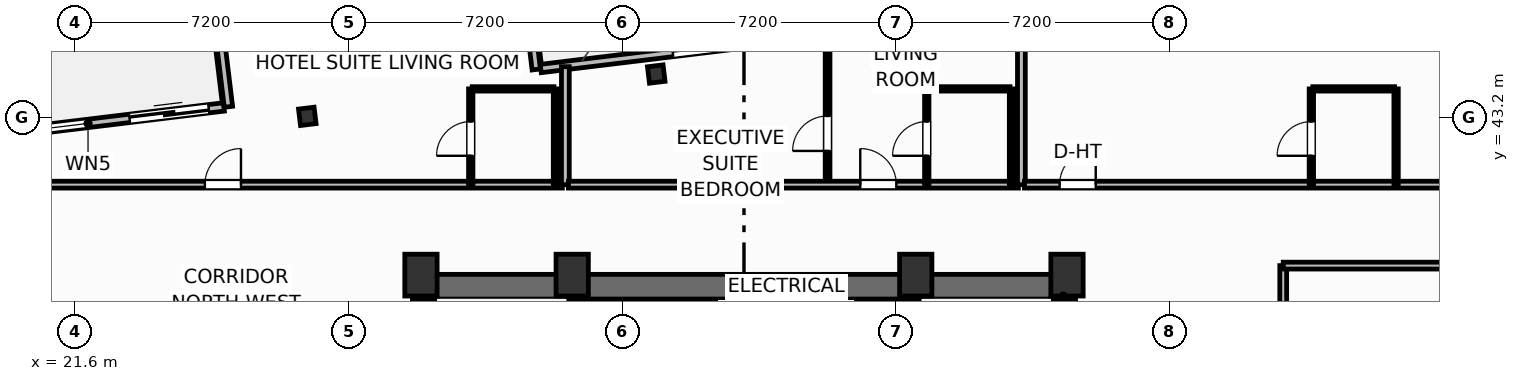
"""IFC4 building model, lengths in metres.
Left out: names, types, materials, properties, quantities, classifications, styles, units other than length and angle.
Written with IfcOpenShell. Run it as: python <this file> out.ifc"""

import sys

from ifc_helpers import new_model, si_unit, direction, frame, frame_2d, origin, origin_2d, place, context, subcontext, project, spatial, rectangle, i_section, extrude, element, fill, save


model = new_model("IFC4")
c1 = context("Model", 3, precision=1e-05, world=origin(), true_north=direction((0.0, 1.0)))
c2 = subcontext(c1, "Body", "Model", "MODEL_VIEW")
j1 = project(units=[si_unit("LENGTHUNIT", "METRE"), si_unit("PLANEANGLEUNIT", "RADIAN")], contexts=[c1])
p1 = place(None, origin())
s1 = spatial("IfcSite", under=j1, at=p1, CompositionType="ELEMENT")
p2 = place(p1, origin())
s2 = spatial("IfcBuilding", under=s1, at=p2, CompositionType="ELEMENT")
p3 = place(p2, frame((0.0, 0.0, 174.6)))
s3 = spatial("IfcBuildingStorey", under=s2, at=p3, CompositionType="ELEMENT", Elevation=174.6)
for number, where, z_axis, x_axis in (
    (1, (30.7, 39.05, 0.0), (0.0, 0.0, 1.0), (1.0, 0.0, 0.0)),
    (2, (34.68, 39.05, 0.0), (0.0, 0.0, 1.0), (1.0, 0.0, 0.0)),
    (3, (43.72, 39.05, 0.0), (0.0, 0.0, 1.0), (1.0, 0.0, 0.0)),
    (4, (47.7, 39.05, 0.0), (0.0, 0.0, 1.0), (1.0, 0.0, 0.0)),
):
    element("IfcColumn", number, at=place(p3, frame(where, z_axis=z_axis, x_axis=x_axis)), inside=s3, PredefinedType="COLUMN", context=c2, shape_type="SweptSolid", body=[
        extrude(rectangle(XDim=0.85, YDim=1.1, at=origin_2d()), origin(), (0.0, 0.0, 1.0), 3.7),
    ])
p4 = place(p3, frame((30.48, 38.745, 0.0), z_axis=(0.0, 0.0, 1.0), x_axis=(1.0, 0.0, 0.0)))
e5 = element("IfcWall", 5, at=p4, inside=s3, PredefinedType="SHEAR", context=c2, shape_type="SweptSolid", body=[
    extrude(rectangle(XDim=17.44, YDim=0.65, at=frame_2d((8.72, 0.0))), origin(), (0.0, 0.0, 1.0), 3.45),
])
for number, where, z_axis, x_axis in (
    (6, (30.805, 29.2, 0.0), (0.0, 0.0, 1.0), (0.0, 1.0, 0.0)),
    (7, (47.595, 29.2, 0.0), (0.0, 0.0, 1.0), (0.0, 1.0, 0.0)),
):
    element("IfcWall", number, at=place(p3, frame(where, z_axis=z_axis, x_axis=x_axis)), inside=s3, PredefinedType="SHEAR", context=c2, shape_type="SweptSolid", body=[
        extrude(rectangle(XDim=9.22, YDim=0.65, at=frame_2d((4.61, 0.0))), origin(), (0.0, 0.0, 1.0), 3.45),
    ])
p5 = place(p3, frame((34.64, 29.2, 0.0), z_axis=(0.0, 0.0, 1.0), x_axis=(0.0, 1.0, 0.0)))
e8 = element("IfcWall", 8, at=p5, inside=s3, PredefinedType="SHEAR", context=c2, shape_type="SweptSolid", body=[
    extrude(rectangle(XDim=9.22, YDim=0.25, at=frame_2d((4.61, 0.0))), origin(), (0.0, 0.0, 1.0), 3.45),
])
p6 = place(p5, frame((0.65, 0.0, 0.0)))
e9 = element("IfcOpeningElement", 9, at=p6, cuts=e8, PredefinedType="OPENING", context=c2, shape_type="SweptSolid", body=[
    extrude(rectangle(XDim=1.05, YDim=2.15, at=frame_2d((0.525, 1.075))), frame((0.0, 0.135, 0.0), z_axis=(0.0, -1.0, 0.0), x_axis=(1.0, 0.0, 0.0)), (0.0, 0.0, 1.0), 0.27),
])
p7 = place(p3, frame((43.76, 29.2, 0.0), z_axis=(0.0, 0.0, 1.0), x_axis=(0.0, 1.0, 0.0)))
e10 = element("IfcWall", 10, at=p7, inside=s3, PredefinedType="SHEAR", context=c2, shape_type="SweptSolid", body=[
    extrude(rectangle(XDim=9.22, YDim=0.25, at=frame_2d((4.61, 0.0))), origin(), (0.0, 0.0, 1.0), 3.45),
])
p8 = place(p7, frame((0.65, 0.0, 0.0)))
e11 = element("IfcOpeningElement", 11, at=p8, cuts=e10, PredefinedType="OPENING", context=c2, shape_type="SweptSolid", body=[
    extrude(rectangle(XDim=1.05, YDim=2.15, at=frame_2d((0.525, 1.075))), frame((0.0, 0.135, 0.0), z_axis=(0.0, -1.0, 0.0), x_axis=(1.0, 0.0, 0.0)), (0.0, 0.0, 1.0), 0.27),
])
for number, where, z_axis, x_axis in (
    (12, (36.892, 44.341, 0.0), (0.0, 0.0, 1.0), (0.993, 0.12, 0.0)),
    (13, (27.709, 43.227, 0.0), (0.0, 0.0, 1.0), (0.993, 0.12, 0.0)),
):
    element("IfcColumn", number, at=place(p3, frame(where, z_axis=z_axis, x_axis=x_axis)), inside=s3, PredefinedType="COLUMN", context=c2, shape_type="SweptSolid", body=[
        extrude(i_section(OverallWidth=0.412, OverallDepth=0.435, WebThickness=0.036, FlangeThickness=0.057, FilletRadius=0.025, at=origin_2d()), origin(), (0.0, 0.0, 1.0), 3.7),
    ])
p9 = place(p3, frame((19.557, 42.753, 0.0), z_axis=(0.0, 0.0, 1.0), x_axis=(0.992729951822, 0.120362962556, 0.0)))
e14 = element("IfcWall", 14, at=p9, inside=s3, PredefinedType="SOLIDWALL", context=c2, shape_type="SweptSolid", body=[
    extrude(rectangle(XDim=6.0, YDim=0.22, at=frame_2d((3.0, 0.0))), origin(), (0.0, 0.0, 1.0), 2.73),
])
p10 = place(p9, frame((3.5, 0.0, 0.0)))
e15 = element("IfcOpeningElement", 15, at=p10, cuts=e14, PredefinedType="OPENING", context=c2, shape_type="SweptSolid", body=[
    extrude(rectangle(XDim=2.1, YDim=2.3, at=frame_2d((1.05, 1.15))), frame((0.0, 0.12, 0.0), z_axis=(0.0, -1.0, 0.0), x_axis=(1.0, 0.0, 0.0)), (0.0, 0.0, 1.0), 0.24),
])
p11 = place(p9, frame((0.55, 0.0, 0.75)))
e16 = element("IfcOpeningElement", 16, at=p11, cuts=e14, PredefinedType="OPENING", context=c2, shape_type="SweptSolid", body=[
    extrude(rectangle(XDim=1.85, YDim=1.75, at=frame_2d((0.925, 0.875))), frame((0.0, 0.12, 0.0), z_axis=(0.0, -1.0, 0.0), x_axis=(1.0, 0.0, 0.0)), (0.0, 0.0, 1.0), 0.24),
])
p12 = place(p3, frame((33.852, 44.486, 0.0), z_axis=(0.0, 0.0, 1.0), x_axis=(0.992729951822, 0.120362962556, 0.0)))
e17 = element("IfcWall", 17, at=p12, inside=s3, PredefinedType="SOLIDWALL", context=c2, shape_type="SweptSolid", body=[
    extrude(rectangle(XDim=6.0, YDim=0.22, at=frame_2d((3.0, 0.0))), origin(), (0.0, 0.0, 1.0), 2.73),
])
p13 = place(p12, frame((3.5, 0.0, 0.0)))
e18 = element("IfcOpeningElement", 18, at=p13, cuts=e17, PredefinedType="OPENING", context=c2, shape_type="SweptSolid", body=[
    extrude(rectangle(XDim=2.1, YDim=2.3, at=frame_2d((1.05, 1.15))), frame((0.0, 0.12, 0.0), z_axis=(0.0, -1.0, 0.0), x_axis=(1.0, 0.0, 0.0)), (0.0, 0.0, 1.0), 0.24),
])
p14 = place(p3, frame((33.734, 44.461, 0.0), z_axis=(0.0, 0.0, 1.0), x_axis=(-0.120327895535, 0.992734202874, 0.0)))
e19 = element("IfcWall", 19, at=p14, inside=s3, PredefinedType="SOLIDWALL", context=c2, shape_type="SweptSolid", body=[
    extrude(rectangle(XDim=2.1, YDim=0.22, at=frame_2d((1.05, 0.0))), origin(), (0.0, 0.0, 1.0), 2.73),
])
p15 = place(p3, frame((25.396, 45.44, 0.0), z_axis=(0.0, 0.0, 1.0), x_axis=(0.120275992932, -0.992740492538, 0.0)))
e20 = element("IfcWall", 20, at=p15, inside=s3, PredefinedType="SOLIDWALL", context=c2, shape_type="SweptSolid", body=[
    extrude(rectangle(XDim=1.975, YDim=0.22, at=frame_2d((0.988, 0.0))), origin(), (0.0, 0.0, 1.0), 2.73),
])
p16 = place(p3, frame((3.393, 41.43, 0.0), z_axis=(0.0, 0.0, 1.0), x_axis=(1.0, 0.0, 0.0)))
e21 = element("IfcWall", 21, at=p16, inside=s3, PredefinedType="PARTITIONING", context=c2, shape_type="SweptSolid", body=[
    extrude(rectangle(XDim=31.027, YDim=0.18, at=frame_2d((15.513, 0.0))), origin(), (0.0, 0.0, 1.0), 2.662),
])
p17 = place(p16, frame((21.621, 0.0, 0.0)))
e22 = element("IfcOpeningElement", 22, at=p17, cuts=e21, PredefinedType="OPENING", context=c2, shape_type="SweptSolid", body=[
    extrude(rectangle(XDim=0.95, YDim=2.15, at=frame_2d((0.475, 1.075))), frame((0.0, 0.1, 0.0), z_axis=(0.0, -1.0, 0.0), x_axis=(1.0, 0.0, 0.0)), (0.0, 0.0, 1.0), 0.2),
])
p18 = place(p3, frame((32.05, 43.95, 0.0), z_axis=(0.0, 0.0, 1.0), x_axis=(1.0, 0.0, 0.0)))
e23 = element("IfcWall", 23, at=p18, inside=s3, PredefinedType="PARTITIONING", context=c2, shape_type="SweptSolid", body=[
    extrude(rectangle(XDim=2.15, YDim=0.115, at=frame_2d((1.075, 0.0))), origin(), (0.0, 0.0, 1.0), 2.824),
])
p19 = place(p3, frame((32.01, 41.43, 0.0), z_axis=(0.0, 0.0, 1.0), x_axis=(0.0, 1.0, 0.0)))
e24 = element("IfcWall", 24, at=p19, inside=s3, PredefinedType="PARTITIONING", context=c2, shape_type="SweptSolid", body=[
    extrude(rectangle(XDim=2.52, YDim=0.115, at=frame_2d((1.26, 0.0))), origin(), (0.0, 0.0, 1.0), 3.45),
])
p20 = place(p19, frame((0.76, 0.0, 0.0)))
e25 = element("IfcOpeningElement", 25, at=p20, cuts=e24, PredefinedType="OPENING", context=c2, shape_type="SweptSolid", body=[
    extrude(rectangle(XDim=0.9, YDim=2.05, at=frame_2d((0.45, 1.025))), frame((0.0, 0.067, 0.0), z_axis=(0.0, -1.0, 0.0), x_axis=(1.0, 0.0, 0.0)), (0.0, 0.0, 1.0), 0.135),
])
p21 = place(p3, frame((34.24, 41.43, 0.0), z_axis=(0.0, 0.0, 1.0), x_axis=(0.0, 1.0, 0.0)))
e26 = element("IfcWall", 26, at=p21, inside=s3, PredefinedType="PARTITIONING", context=c2, shape_type="SweptSolid", body=[
    extrude(rectangle(XDim=2.52, YDim=0.115, at=frame_2d((1.26, 0.0))), origin(), (0.0, 0.0, 1.0), 3.45),
])
p22 = place(p3, frame((34.5, 41.43, 0.0), z_axis=(0.0, 0.0, 1.0), x_axis=(0.0, 1.0, 0.0)))
e27 = element("IfcWall", 27, at=p22, inside=s3, PredefinedType="PARTITIONING", context=c2, shape_type="SweptSolid", body=[
    extrude(rectangle(XDim=3.104, YDim=0.205, at=frame_2d((1.552, 0.0))), origin(), (0.0, 0.0, 1.0), 3.45),
])
p23 = place(p3, frame((41.4, 41.43, 0.0), z_axis=(0.0, 0.0, 1.0), x_axis=(0.0, 1.0, 0.0)))
e28 = element("IfcWall", 28, at=p23, inside=s3, PredefinedType="PARTITIONING", context=c2, shape_type="SweptSolid", body=[
    extrude(rectangle(XDim=6.056, YDim=0.125, at=frame_2d((3.028, 0.0))), origin(), (0.0, 0.0, 1.0), 3.45),
])
p24 = place(p23, frame((0.888, 0.0, 0.0)))
e29 = element("IfcOpeningElement", 29, at=p24, cuts=e28, PredefinedType="OPENING", context=c2, shape_type="SweptSolid", body=[
    extrude(rectangle(XDim=0.92, YDim=2.05, at=frame_2d((0.46, 1.025))), frame((0.0, 0.073, 0.0), z_axis=(0.0, -1.0, 0.0), x_axis=(1.0, 0.0, 0.0)), (0.0, 0.0, 1.0), 0.145),
])
p25 = place(p3, frame((34.58, 41.43, 0.0), z_axis=(0.0, 0.0, 1.0), x_axis=(1.0, 0.0, 0.0)))
e30 = element("IfcWall", 30, at=p25, inside=s3, PredefinedType="PARTITIONING", context=c2, shape_type="SweptSolid", body=[
    extrude(rectangle(XDim=11.84, YDim=0.18, at=frame_2d((5.92, 0.0))), origin(), (0.0, 0.0, 1.0), 3.45),
])
p26 = place(p25, frame((7.68, 0.0, 0.0)))
e31 = element("IfcOpeningElement", 31, at=p26, cuts=e30, PredefinedType="OPENING", context=c2, shape_type="SweptSolid", body=[
    extrude(rectangle(XDim=0.95, YDim=2.15, at=frame_2d((0.475, 1.075))), frame((0.0, 0.1, 0.0), z_axis=(0.0, -1.0, 0.0), x_axis=(1.0, 0.0, 0.0)), (0.0, 0.0, 1.0), 0.2),
])
p27 = place(p3, frame((44.05, 43.95, 0.0), z_axis=(0.0, 0.0, 1.0), x_axis=(1.0, 0.0, 0.0)))
e32 = element("IfcWall", 32, at=p27, inside=s3, PredefinedType="PARTITIONING", context=c2, shape_type="SweptSolid", body=[
    extrude(rectangle(XDim=2.15, YDim=0.115, at=frame_2d((1.075, 0.0))), origin(), (0.0, 0.0, 1.0), 3.45),
])
p28 = place(p3, frame((44.01, 41.43, 0.0), z_axis=(0.0, 0.0, 1.0), x_axis=(0.0, 1.0, 0.0)))
e33 = element("IfcWall", 33, at=p28, inside=s3, PredefinedType="PARTITIONING", context=c2, shape_type="SweptSolid", body=[
    extrude(rectangle(XDim=2.52, YDim=0.115, at=frame_2d((1.26, 0.0))), origin(), (0.0, 0.0, 1.0), 3.45),
])
p29 = place(p28, frame((0.76, 0.0, 0.0)))
e34 = element("IfcOpeningElement", 34, at=p29, cuts=e33, PredefinedType="OPENING", context=c2, shape_type="SweptSolid", body=[
    extrude(rectangle(XDim=0.9, YDim=2.05, at=frame_2d((0.45, 1.025))), frame((0.0, 0.067, 0.0), z_axis=(0.0, -1.0, 0.0), x_axis=(1.0, 0.0, 0.0)), (0.0, 0.0, 1.0), 0.135),
])
p30 = place(p3, frame((46.24, 41.43, 0.0), z_axis=(0.0, 0.0, 1.0), x_axis=(0.0, 1.0, 0.0)))
e35 = element("IfcWall", 35, at=p30, inside=s3, PredefinedType="PARTITIONING", context=c2, shape_type="SweptSolid", body=[
    extrude(rectangle(XDim=2.52, YDim=0.115, at=frame_2d((1.26, 0.0))), origin(), (0.0, 0.0, 1.0), 3.45),
])
p31 = place(p3, frame((46.5, 41.43, 0.0), z_axis=(0.0, 0.0, 1.0), x_axis=(0.0, 1.0, 0.0)))
e36 = element("IfcWall", 36, at=p31, inside=s3, PredefinedType="PARTITIONING", context=c2, shape_type="SweptSolid", body=[
    extrude(rectangle(XDim=6.674, YDim=0.205, at=frame_2d((3.337, 0.0))), origin(), (0.0, 0.0, 1.0), 2.662),
])
p32 = place(p3, frame((46.58, 41.43, 0.0), z_axis=(0.0, 0.0, 1.0), x_axis=(1.0, 0.0, 0.0)))
e37 = element("IfcWall", 37, at=p32, inside=s3, PredefinedType="PARTITIONING", context=c2, shape_type="SweptSolid", body=[
    extrude(rectangle(XDim=26.042, YDim=0.18, at=frame_2d((13.021, 0.0))), origin(), (0.0, 0.0, 1.0), 3.45),
])
p33 = place(p32, frame((0.926, 0.0, 0.0)))
e38 = element("IfcOpeningElement", 38, at=p33, cuts=e37, PredefinedType="OPENING", context=c2, shape_type="SweptSolid", body=[
    extrude(rectangle(XDim=0.95, YDim=2.15, at=frame_2d((0.475, 1.075))), frame((0.0, 0.1, 0.0), z_axis=(0.0, -1.0, 0.0), x_axis=(1.0, 0.0, 0.0)), (0.0, 0.0, 1.0), 0.2),
])
p34 = place(p3, frame((54.17, 43.95, 0.0), z_axis=(0.0, 0.0, 1.0), x_axis=(1.0, 0.0, 0.0)))
e39 = element("IfcWall", 39, at=p34, inside=s3, PredefinedType="PARTITIONING", context=c2, shape_type="SweptSolid", body=[
    extrude(rectangle(XDim=2.15, YDim=0.115, at=frame_2d((1.075, 0.0))), origin(), (0.0, 0.0, 1.0), 3.45),
])
p35 = place(p3, frame((54.13, 41.43, 0.0), z_axis=(0.0, 0.0, 1.0), x_axis=(0.0, 1.0, 0.0)))
e40 = element("IfcWall", 40, at=p35, inside=s3, PredefinedType="PARTITIONING", context=c2, shape_type="SweptSolid", body=[
    extrude(rectangle(XDim=2.52, YDim=0.115, at=frame_2d((1.26, 0.0))), origin(), (0.0, 0.0, 1.0), 3.45),
])
p36 = place(p35, frame((0.76, 0.0, 0.0)))
e41 = element("IfcOpeningElement", 41, at=p36, cuts=e40, PredefinedType="OPENING", context=c2, shape_type="SweptSolid", body=[
    extrude(rectangle(XDim=0.9, YDim=2.05, at=frame_2d((0.45, 1.025))), frame((0.0, 0.067, 0.0), z_axis=(0.0, -1.0, 0.0), x_axis=(1.0, 0.0, 0.0)), (0.0, 0.0, 1.0), 0.135),
])
p37 = place(p3, frame((56.36, 41.43, 0.0), z_axis=(0.0, 0.0, 1.0), x_axis=(0.0, 1.0, 0.0)))
e42 = element("IfcWall", 42, at=p37, inside=s3, PredefinedType="PARTITIONING", context=c2, shape_type="SweptSolid", body=[
    extrude(rectangle(XDim=2.52, YDim=0.115, at=frame_2d((1.26, 0.0))), origin(), (0.0, 0.0, 1.0), 3.45),
])
p38 = place(p3, frame((53.39, 19.24, 0.0), z_axis=(0.0, 0.0, 1.0), x_axis=(0.0, 1.0, 0.0)))
e43 = element("IfcWall", 43, at=p38, inside=s3, PredefinedType="PARTITIONING", context=c2, shape_type="SweptSolid", body=[
    extrude(rectangle(XDim=20.06, YDim=0.18, at=frame_2d((10.03, 0.0))), origin(), (0.0, 0.0, 1.0), 3.45),
])
p39 = place(p38, frame((7.7, 0.0, 0.0)))
e44 = element("IfcOpeningElement", 44, at=p39, cuts=e43, PredefinedType="OPENING", context=c2, shape_type="SweptSolid", body=[
    extrude(rectangle(XDim=0.95, YDim=2.05, at=frame_2d((0.475, 1.025))), frame((0.0, 0.1, 0.0), z_axis=(0.0, -1.0, 0.0), x_axis=(1.0, 0.0, 0.0)), (0.0, 0.0, 1.0), 0.2),
])
p40 = place(p3, frame((53.39, 39.3, 0.0), z_axis=(0.0, 0.0, 1.0), x_axis=(1.0, 0.0, 0.0)))
e45 = element("IfcWall", 45, at=p40, inside=s3, PredefinedType="PARTITIONING", context=c2, shape_type="SweptSolid", body=[
    extrude(rectangle(XDim=19.49, YDim=0.18, at=frame_2d((9.745, 0.0))), origin(), (0.0, 0.0, 1.0), 3.45),
])
p41 = place(p10, origin())
e46 = element("IfcDoor", 46, at=p41, inside=s3, OperationType="SLIDING_TO_LEFT", PredefinedType="DOOR", context=c2, shape_type="SweptSolid", body=[
    extrude(rectangle(XDim=2.1, YDim=2.3, at=frame_2d((1.05, 1.15))), frame((0.0, 0.025, 0.0), z_axis=(0.0, -1.0, 0.0), x_axis=(1.0, 0.0, 0.0)), (0.0, 0.0, 1.0), 0.05),
])
fill(e15, e46)
p42 = place(p11, origin())
e47 = element("IfcWindow", 47, at=p42, inside=s3, PartitioningType="SINGLE_PANEL", PredefinedType="WINDOW", context=c2, shape_type="SweptSolid", body=[
    extrude(rectangle(XDim=1.85, YDim=1.75, at=frame_2d((0.925, 0.875))), frame((0.0, 0.03, 0.0), z_axis=(0.0, -1.0, 0.0), x_axis=(1.0, 0.0, 0.0)), (0.0, 0.0, 1.0), 0.06),
])
fill(e16, e47)
p43 = place(p13, origin())
e48 = element("IfcDoor", 48, at=p43, inside=s3, OperationType="SLIDING_TO_LEFT", PredefinedType="DOOR", context=c2, shape_type="SweptSolid", body=[
    extrude(rectangle(XDim=2.1, YDim=2.3, at=frame_2d((1.05, 1.15))), frame((0.0, 0.025, 0.0), z_axis=(0.0, -1.0, 0.0), x_axis=(1.0, 0.0, 0.0)), (0.0, 0.0, 1.0), 0.05),
])
fill(e18, e48)
p44 = place(p17, origin())
e49 = element("IfcDoor", 49, at=p44, inside=s3, OperationType="SINGLE_SWING_RIGHT", PredefinedType="DOOR", context=c2, shape_type="SweptSolid", body=[
    extrude(rectangle(XDim=0.95, YDim=2.15, at=frame_2d((0.475, 1.075))), frame((0.0, 0.025, 0.0), z_axis=(0.0, -1.0, 0.0), x_axis=(1.0, 0.0, 0.0)), (0.0, 0.0, 1.0), 0.05),
])
fill(e22, e49)
p45 = place(p20, origin())
e50 = element("IfcDoor", 50, at=p45, inside=s3, OperationType="SINGLE_SWING_LEFT", PredefinedType="DOOR", context=c2, shape_type="SweptSolid", body=[
    extrude(rectangle(XDim=0.9, YDim=2.05, at=frame_2d((0.45, 1.025))), frame((0.0, 0.025, 0.0), z_axis=(0.0, -1.0, 0.0), x_axis=(1.0, 0.0, 0.0)), (0.0, 0.0, 1.0), 0.05),
])
fill(e25, e50)
p46 = place(p24, origin())
e51 = element("IfcDoor", 51, at=p46, inside=s3, OperationType="SINGLE_SWING_LEFT", PredefinedType="DOOR", context=c2, shape_type="SweptSolid", body=[
    extrude(rectangle(XDim=0.92, YDim=2.05, at=frame_2d((0.46, 1.025))), frame((0.0, 0.025, 0.0), z_axis=(0.0, -1.0, 0.0), x_axis=(1.0, 0.0, 0.0)), (0.0, 0.0, 1.0), 0.05),
])
fill(e29, e51)
p47 = place(p26, origin())
e52 = element("IfcDoor", 52, at=p47, inside=s3, OperationType="SINGLE_SWING_LEFT", PredefinedType="DOOR", context=c2, shape_type="SweptSolid", body=[
    extrude(rectangle(XDim=0.95, YDim=2.15, at=frame_2d((0.475, 1.075))), frame((0.0, 0.025, 0.0), z_axis=(0.0, -1.0, 0.0), x_axis=(1.0, 0.0, 0.0)), (0.0, 0.0, 1.0), 0.05),
])
fill(e31, e52)
p48 = place(p29, origin())
e53 = element("IfcDoor", 53, at=p48, inside=s3, OperationType="SINGLE_SWING_LEFT", PredefinedType="DOOR", context=c2, shape_type="SweptSolid", body=[
    extrude(rectangle(XDim=0.9, YDim=2.05, at=frame_2d((0.45, 1.025))), frame((0.0, 0.025, 0.0), z_axis=(0.0, -1.0, 0.0), x_axis=(1.0, 0.0, 0.0)), (0.0, 0.0, 1.0), 0.05),
])
fill(e34, e53)
p49 = place(p33, origin())
e54 = element("IfcDoor", 54, at=p49, inside=s3, OperationType="SINGLE_SWING_RIGHT", PredefinedType="DOOR", context=c2, shape_type="SweptSolid", body=[
    extrude(rectangle(XDim=0.95, YDim=2.15, at=frame_2d((0.475, 1.075))), frame((0.0, 0.025, 0.0), z_axis=(0.0, -1.0, 0.0), x_axis=(1.0, 0.0, 0.0)), (0.0, 0.0, 1.0), 0.05),
])
fill(e38, e54)
p50 = place(p36, origin())
e55 = element("IfcDoor", 55, at=p50, inside=s3, OperationType="SINGLE_SWING_LEFT", PredefinedType="DOOR", context=c2, shape_type="SweptSolid", body=[
    extrude(rectangle(XDim=0.9, YDim=2.05, at=frame_2d((0.45, 1.025))), frame((0.0, 0.025, 0.0), z_axis=(0.0, -1.0, 0.0), x_axis=(1.0, 0.0, 0.0)), (0.0, 0.0, 1.0), 0.05),
])
fill(e41, e55)
save(model, sys.argv[1])
